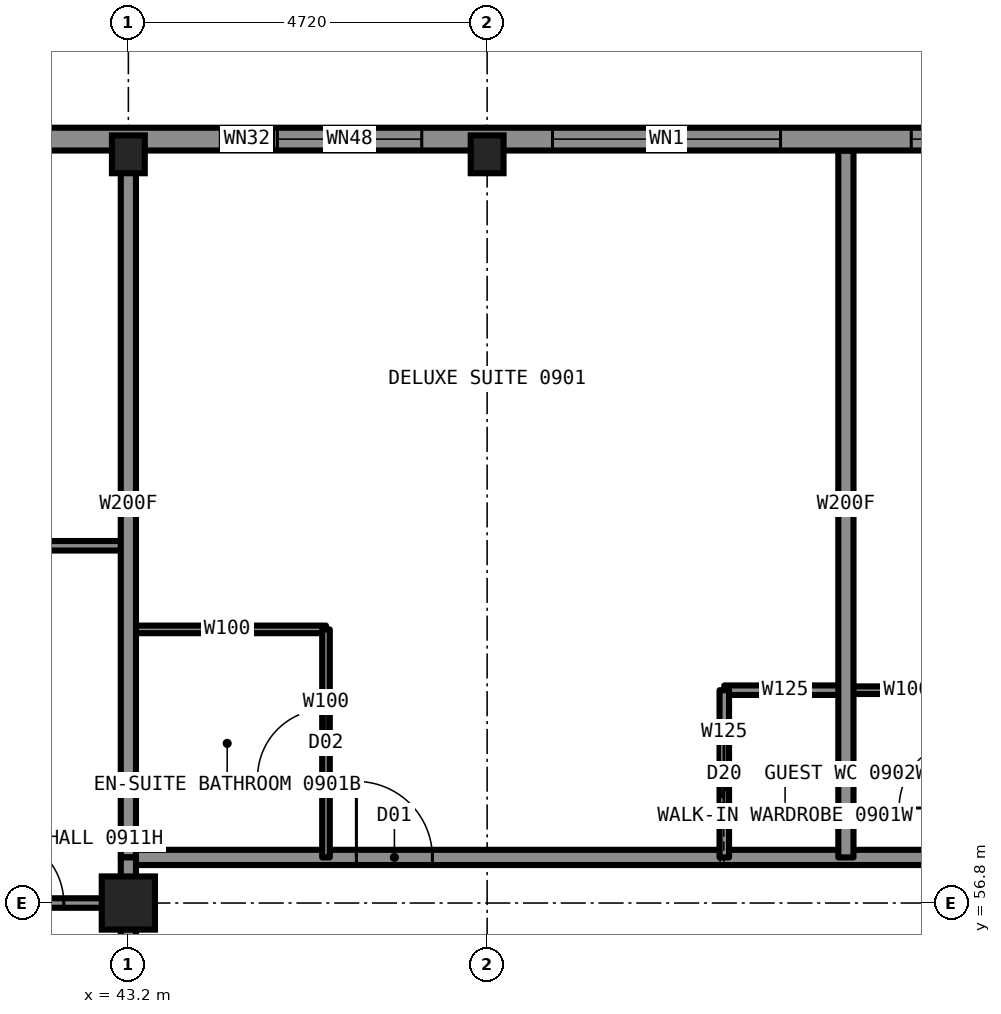
"""IFC4 building model, lengths in metres.
Left out: names, types, materials, properties, quantities, classifications, styles, units other than length and angle.
Written with IfcOpenShell. Run it as: python <this file> out.ifc"""

import sys

from ifc_helpers import new_model, si_unit, direction, frame, frame_2d, origin, origin_2d, place, context, subcontext, project, spatial, rectangle, hollow_rectangle, i_section, extrude, element, fill, save


model = new_model("IFC4")
c1 = context("Model", 3, precision=1e-05, world=origin(), true_north=direction((0.0, 1.0)))
c2 = subcontext(c1, "Body", "Model", "MODEL_VIEW")
j1 = project(units=[si_unit("LENGTHUNIT", "METRE"), si_unit("PLANEANGLEUNIT", "RADIAN")], contexts=[c1])
p1 = place(None, origin())
s1 = spatial("IfcSite", under=j1, at=p1, CompositionType="ELEMENT")
p2 = place(p1, origin())
s2 = spatial("IfcBuilding", under=s1, at=p2, CompositionType="ELEMENT")
p3 = place(p2, frame((0.0, 0.0, 39.0)))
s3 = spatial("IfcBuildingStorey", under=s2, at=p3, CompositionType="ELEMENT", Elevation=39.0)
for number, where, z_axis, x_axis in (
    (1, (43.2, 66.65, 0.0), (0.0, 0.0, 1.0), (1.0, 0.0, 0.0)),
    (2, (47.92, 66.65, 0.0), (0.0, 0.0, 1.0), (1.0, 0.0, 0.0)),
):
    element("IfcColumn", number, at=place(p3, frame(where, z_axis=z_axis, x_axis=x_axis)), inside=s3, PredefinedType="COLUMN", context=c2, shape_type="SweptSolid", body=[
        extrude(i_section(OverallWidth=0.432, OverallDepth=0.498, WebThickness=0.056, FlangeThickness=0.089, at=origin_2d()), origin(), (0.0, 0.0, 1.0), 3.5),
    ])
p4 = place(p3, frame((43.2, 56.8, 0.0), z_axis=(0.0, 0.0, 1.0), x_axis=(1.0, 0.0, 0.0)))
e3 = element("IfcColumn", 3, at=p4, inside=s3, PredefinedType="COLUMN", context=c2, shape_type="SweptSolid", body=[
    extrude(hollow_rectangle(XDim=0.7, YDim=0.7, WallThickness=0.06, at=origin_2d()), origin(), (0.0, 0.0, 1.0), 3.5),
])
p5 = place(p3, frame((33.3, 56.8, 0.0), z_axis=(0.0, 0.0, 1.0), x_axis=(1.0, 0.0, 0.0)))
e4 = element("IfcWall", 4, at=p5, inside=s3, PredefinedType="PARTITIONING", context=c2, shape_type="SweptSolid", body=[
    extrude(rectangle(XDim=9.9, YDim=0.125, at=frame_2d((4.95, 0.0))), origin(), (0.0, 0.0, 1.0), 2.573),
])
p6 = place(p5, frame((8.15, 0.0, 0.0)))
e5 = element("IfcOpeningElement", 5, at=p6, cuts=e4, PredefinedType="OPENING", context=c2, shape_type="SweptSolid", body=[
    extrude(rectangle(XDim=0.9, YDim=2.2, at=frame_2d((0.45, 1.1))), frame((0.0, 0.073, 0.0), z_axis=(0.0, -1.0, 0.0), x_axis=(1.0, 0.0, 0.0)), (0.0, 0.0, 1.0), 0.145),
])
p7 = place(p3, frame((43.2, 57.4, 0.0), z_axis=(0.0, 0.0, 1.0), x_axis=(1.0, 0.0, 0.0)))
e6 = element("IfcWall", 6, at=p7, inside=s3, PredefinedType="PARTITIONING", context=c2, shape_type="SweptSolid", body=[
    extrude(rectangle(XDim=23.6, YDim=0.2, at=frame_2d((11.8, 0.0))), origin(), (0.0, 0.0, 1.0), 3.33),
])
p8 = place(p7, frame((3.0, 0.0, 0.0)))
e7 = element("IfcOpeningElement", 7, at=p8, cuts=e6, PredefinedType="OPENING", context=c2, shape_type="SweptSolid", body=[
    extrude(rectangle(XDim=1.0, YDim=2.2, at=frame_2d((0.5, 1.1))), frame((0.0, 0.11, 0.0), z_axis=(0.0, -1.0, 0.0), x_axis=(1.0, 0.0, 0.0)), (0.0, 0.0, 1.0), 0.22),
])
p9 = place(p7, frame((11.29, 0.0, 0.0)))
e8 = element("IfcOpeningElement", 8, at=p9, cuts=e6, PredefinedType="OPENING", context=c2, shape_type="SweptSolid", body=[
    extrude(rectangle(XDim=1.1, YDim=2.2, at=frame_2d((0.55, 1.1))), frame((0.0, 0.11, 0.0), z_axis=(0.0, -1.0, 0.0), x_axis=(1.0, 0.0, 0.0)), (0.0, 0.0, 1.0), 0.22),
])
p10 = place(p3, frame((52.64, 59.6, 0.0), z_axis=(0.0, 0.0, 1.0), x_axis=(1.0, 0.0, 0.0)))
e9 = element("IfcWall", 9, at=p10, inside=s3, PredefinedType="PARTITIONING", context=c2, shape_type="SweptSolid", body=[
    extrude(rectangle(XDim=1.6, YDim=0.1, at=frame_2d((0.8, 0.0))), origin(), (0.0, 0.0, 1.0), 3.33),
])
p11 = place(p3, frame((51.04, 59.6, 0.0), z_axis=(0.0, 0.0, 1.0), x_axis=(1.0, 0.0, 0.0)))
e10 = element("IfcWall", 10, at=p11, inside=s3, PredefinedType="PARTITIONING", context=c2, shape_type="SweptSolid", body=[
    extrude(rectangle(XDim=1.6, YDim=0.125, at=frame_2d((0.8, 0.0))), origin(), (0.0, 0.0, 1.0), 3.33),
])
p12 = place(p3, frame((43.2, 60.4, 0.0), z_axis=(0.0, 0.0, 1.0), x_axis=(1.0, 0.0, 0.0)))
e11 = element("IfcWall", 11, at=p12, inside=s3, PredefinedType="PARTITIONING", context=c2, shape_type="SweptSolid", body=[
    extrude(rectangle(XDim=2.6, YDim=0.1, at=frame_2d((1.3, 0.0))), origin(), (0.0, 0.0, 1.0), 3.33),
])
p13 = place(p3, frame((33.306, 61.5, 0.0), z_axis=(0.0, 0.0, 1.0), x_axis=(1.0, 0.0, 0.0)))
e12 = element("IfcWall", 12, at=p13, inside=s3, PredefinedType="PARTITIONING", context=c2, shape_type="SweptSolid", body=[
    extrude(rectangle(XDim=9.894, YDim=0.125, at=frame_2d((4.947, 0.0))), origin(), (0.0, 0.0, 1.0), 3.33),
])
p14 = place(p13, frame((7.244, 0.0, 0.0)))
e13 = element("IfcOpeningElement", 13, at=p14, cuts=e12, PredefinedType="OPENING", context=c2, shape_type="SweptSolid", body=[
    extrude(rectangle(XDim=0.9, YDim=2.2, at=frame_2d((0.45, 1.1))), frame((0.0, 0.073, 0.0), z_axis=(0.0, -1.0, 0.0), x_axis=(1.0, 0.0, 0.0)), (0.0, 0.0, 1.0), 0.145),
])
p15 = place(p3, frame((43.2, 33.2, 0.0), z_axis=(0.0, 0.0, 1.0), x_axis=(0.0, 1.0, 0.0)))
e14 = element("IfcWall", 14, at=p15, inside=s3, PredefinedType="PARTITIONING", context=c2, shape_type="SweptSolid", body=[
    extrude(rectangle(XDim=23.58, YDim=0.2, at=frame_2d((11.79, 0.0))), origin(), (0.0, 0.0, 1.0), 3.33),
])
p16 = place(p15, frame((7.27, 0.0, 0.0)))
e15 = element("IfcOpeningElement", 15, at=p16, cuts=e14, PredefinedType="OPENING", context=c2, shape_type="SweptSolid", body=[
    extrude(rectangle(XDim=1.0, YDim=2.2, at=frame_2d((0.5, 1.1))), frame((0.0, 0.11, 0.0), z_axis=(0.0, -1.0, 0.0), x_axis=(1.0, 0.0, 0.0)), (0.0, 0.0, 1.0), 0.22),
])
p17 = place(p15, frame((12.44, 0.0, 0.0)))
e16 = element("IfcOpeningElement", 16, at=p17, cuts=e14, PredefinedType="OPENING", context=c2, shape_type="SweptSolid", body=[
    extrude(rectangle(XDim=1.0, YDim=2.2, at=frame_2d((0.5, 1.1))), frame((0.0, 0.11, 0.0), z_axis=(0.0, -1.0, 0.0), x_axis=(1.0, 0.0, 0.0)), (0.0, 0.0, 1.0), 0.22),
])
p18 = place(p15, frame((21.84, 0.0, 0.0)))
e17 = element("IfcOpeningElement", 17, at=p18, cuts=e14, PredefinedType="OPENING", context=c2, shape_type="SweptSolid", body=[
    extrude(rectangle(XDim=1.1, YDim=2.2, at=frame_2d((0.55, 1.1))), frame((0.0, 0.11, 0.0), z_axis=(0.0, -1.0, 0.0), x_axis=(1.0, 0.0, 0.0)), (0.0, 0.0, 1.0), 0.22),
])
p19 = place(p15, frame((0.66, 0.0, 0.0)))
e18 = element("IfcOpeningElement", 18, at=p19, cuts=e14, PredefinedType="OPENING", context=c2, shape_type="SweptSolid", body=[
    extrude(rectangle(XDim=1.1, YDim=2.2, at=frame_2d((0.55, 1.1))), frame((0.0, 0.11, 0.0), z_axis=(0.0, -1.0, 0.0), x_axis=(1.0, 0.0, 0.0)), (0.0, 0.0, 1.0), 0.22),
])
p20 = place(p3, frame((43.2, 57.4, 0.0), z_axis=(0.0, 0.0, 1.0), x_axis=(0.0, 1.0, 0.0)))
e19 = element("IfcWall", 19, at=p20, inside=s3, PredefinedType="PARTITIONING", context=c2, shape_type="SweptSolid", body=[
    extrude(rectangle(XDim=9.3, YDim=0.2, at=frame_2d((4.65, 0.0))), origin(), (0.0, 0.0, 1.0), 2.573),
])
p21 = place(p3, frame((52.64, 57.4, 0.0), z_axis=(0.0, 0.0, 1.0), x_axis=(0.0, 1.0, 0.0)))
e20 = element("IfcWall", 20, at=p21, inside=s3, PredefinedType="PARTITIONING", context=c2, shape_type="SweptSolid", body=[
    extrude(rectangle(XDim=9.3, YDim=0.2, at=frame_2d((4.65, 0.0))), origin(), (0.0, 0.0, 1.0), 3.33),
])
p22 = place(p3, frame((51.04, 57.4, 0.0), z_axis=(0.0, 0.0, 1.0), x_axis=(0.0, 1.0, 0.0)))
e21 = element("IfcWall", 21, at=p22, inside=s3, PredefinedType="PARTITIONING", context=c2, shape_type="SweptSolid", body=[
    extrude(rectangle(XDim=2.2, YDim=0.125, at=frame_2d((1.1, 0.0))), origin(), (0.0, 0.0, 1.0), 3.33),
])
p23 = place(p22, frame((0.7, 0.0, 0.0)))
e22 = element("IfcOpeningElement", 22, at=p23, cuts=e21, PredefinedType="OPENING", context=c2, shape_type="SweptSolid", body=[
    extrude(rectangle(XDim=0.8, YDim=2.1, at=frame_2d((0.4, 1.05))), frame((0.0, 0.073, 0.0), z_axis=(0.0, -1.0, 0.0), x_axis=(1.0, 0.0, 0.0)), (0.0, 0.0, 1.0), 0.145),
])
p24 = place(p3, frame((45.8, 57.4, 0.0), z_axis=(0.0, 0.0, 1.0), x_axis=(0.0, 1.0, 0.0)))
e23 = element("IfcWall", 23, at=p24, inside=s3, PredefinedType="PARTITIONING", context=c2, shape_type="SweptSolid", body=[
    extrude(rectangle(XDim=3.0, YDim=0.1, at=frame_2d((1.5, 0.0))), origin(), (0.0, 0.0, 1.0), 3.33),
])
p25 = place(p24, frame((1.05, 0.0, 0.0)))
e24 = element("IfcOpeningElement", 24, at=p25, cuts=e23, PredefinedType="OPENING", context=c2, shape_type="SweptSolid", body=[
    extrude(rectangle(XDim=0.9, YDim=2.1, at=frame_2d((0.45, 1.05))), frame((0.0, 0.06, 0.0), z_axis=(0.0, -1.0, 0.0), x_axis=(1.0, 0.0, 0.0)), (0.0, 0.0, 1.0), 0.12),
])
p26 = place(p3, frame((71.5, 66.85, 0.0), z_axis=(0.0, 0.0, 1.0), x_axis=(-1.0, 0.0, 0.0)))
e25 = element("IfcWall", 25, at=p26, inside=s3, PredefinedType="SOLIDWALL", context=c2, shape_type="SweptSolid", body=[
    extrude(rectangle(XDim=33.0, YDim=0.3, at=frame_2d((16.5, 0.0))), origin(), (0.0, 0.0, 1.0), 2.83),
])
p27 = place(p26, frame((0.85, 0.0, 0.5)))
e26 = element("IfcOpeningElement", 26, at=p27, cuts=e25, PredefinedType="OPENING", context=c2, shape_type="SweptSolid", body=[
    extrude(rectangle(XDim=2.5, YDim=2.0, at=frame_2d((1.25, 1.0))), frame((0.0, 0.16, 0.0), z_axis=(0.0, -1.0, 0.0), x_axis=(1.0, 0.0, 0.0)), (0.0, 0.0, 1.0), 0.32),
])
p28 = place(p26, frame((6.61, 0.0, 0.5)))
e27 = element("IfcOpeningElement", 27, at=p28, cuts=e25, PredefinedType="OPENING", context=c2, shape_type="SweptSolid", body=[
    extrude(rectangle(XDim=1.9, YDim=1.9, at=frame_2d((0.95, 0.95))), frame((0.0, 0.16, 0.0), z_axis=(0.0, -1.0, 0.0), x_axis=(1.0, 0.0, 0.0)), (0.0, 0.0, 1.0), 0.32),
])
p29 = place(p26, frame((10.28, 0.0, 0.5)))
e28 = element("IfcOpeningElement", 28, at=p29, cuts=e25, PredefinedType="OPENING", context=c2, shape_type="SweptSolid", body=[
    extrude(rectangle(XDim=3.0, YDim=2.0, at=frame_2d((1.5, 1.0))), frame((0.0, 0.16, 0.0), z_axis=(0.0, -1.0, 0.0), x_axis=(1.0, 0.0, 0.0)), (0.0, 0.0, 1.0), 0.32),
])
p30 = place(p26, frame((15.0, 0.0, 0.5)))
e29 = element("IfcOpeningElement", 29, at=p30, cuts=e25, PredefinedType="OPENING", context=c2, shape_type="SweptSolid", body=[
    extrude(rectangle(XDim=3.0, YDim=2.0, at=frame_2d((1.5, 1.0))), frame((0.0, 0.16, 0.0), z_axis=(0.0, -1.0, 0.0), x_axis=(1.0, 0.0, 0.0)), (0.0, 0.0, 1.0), 0.32),
])
p31 = place(p26, frame((19.72, 0.0, 0.5)))
e30 = element("IfcOpeningElement", 30, at=p31, cuts=e25, PredefinedType="OPENING", context=c2, shape_type="SweptSolid", body=[
    extrude(rectangle(XDim=3.0, YDim=2.0, at=frame_2d((1.5, 1.0))), frame((0.0, 0.16, 0.0), z_axis=(0.0, -1.0, 0.0), x_axis=(1.0, 0.0, 0.0)), (0.0, 0.0, 1.0), 0.32),
])
p32 = place(p26, frame((24.44, 0.0, 0.5)))
e31 = element("IfcOpeningElement", 31, at=p32, cuts=e25, PredefinedType="OPENING", context=c2, shape_type="SweptSolid", body=[
    extrude(rectangle(XDim=1.9, YDim=1.9, at=frame_2d((0.95, 0.95))), frame((0.0, 0.16, 0.0), z_axis=(0.0, -1.0, 0.0), x_axis=(1.0, 0.0, 0.0)), (0.0, 0.0, 1.0), 0.32),
])
p33 = place(p26, frame((29.6, 0.0, 0.5)))
e32 = element("IfcOpeningElement", 32, at=p33, cuts=e25, PredefinedType="OPENING", context=c2, shape_type="SweptSolid", body=[
    extrude(rectangle(XDim=2.5, YDim=2.0, at=frame_2d((1.25, 1.0))), frame((0.0, 0.16, 0.0), z_axis=(0.0, -1.0, 0.0), x_axis=(1.0, 0.0, 0.0)), (0.0, 0.0, 1.0), 0.32),
])
p34 = place(p26, frame((5.91, 0.0, 0.5)))
e33 = element("IfcOpeningElement", 33, at=p34, cuts=e25, PredefinedType="OPENING", context=c2, shape_type="SweptSolid", body=[
    extrude(rectangle(XDim=0.7, YDim=1.0, at=frame_2d((0.35, 0.5))), frame((0.0, 0.16, 0.0), z_axis=(0.0, -1.0, 0.0), x_axis=(1.0, 0.0, 0.0)), (0.0, 0.0, 1.0), 0.32),
])
p35 = place(p26, frame((26.39, 0.0, 0.5)))
e34 = element("IfcOpeningElement", 34, at=p35, cuts=e25, PredefinedType="OPENING", context=c2, shape_type="SweptSolid", body=[
    extrude(rectangle(XDim=0.7, YDim=1.0, at=frame_2d((0.35, 0.5))), frame((0.0, 0.16, 0.0), z_axis=(0.0, -1.0, 0.0), x_axis=(1.0, 0.0, 0.0)), (0.0, 0.0, 1.0), 0.32),
])
p36 = place(p3, frame((43.2, 56.78, 0.0), z_axis=(0.0, 0.0, 1.0), x_axis=(0.0, 1.0, 0.0)))
e35 = element("IfcWall", 35, at=p36, inside=s3, PredefinedType="PARTITIONING", context=c2, shape_type="SweptSolid", body=[
    extrude(rectangle(XDim=0.62, YDim=0.2, at=frame_2d((0.31, 0.0))), origin(), (0.0, 0.0, 1.0), 2.573),
])
p37 = place(p8, origin())
e36 = element("IfcDoor", 36, at=p37, inside=s3, OperationType="SINGLE_SWING_LEFT", PredefinedType="DOOR", context=c2, shape_type="SweptSolid", body=[
    extrude(rectangle(XDim=1.0, YDim=2.2, at=frame_2d((0.5, 1.1))), frame((0.0, 0.025, 0.0), z_axis=(0.0, -1.0, 0.0), x_axis=(1.0, 0.0, 0.0)), (0.0, 0.0, 1.0), 0.05),
])
fill(e7, e36)
p38 = place(p25, origin())
e37 = element("IfcDoor", 37, at=p38, inside=s3, OperationType="SINGLE_SWING_RIGHT", PredefinedType="DOOR", context=c2, shape_type="SweptSolid", body=[
    extrude(rectangle(XDim=0.9, YDim=2.1, at=frame_2d((0.45, 1.05))), frame((0.0, 0.025, 0.0), z_axis=(0.0, -1.0, 0.0), x_axis=(1.0, 0.0, 0.0)), (0.0, 0.0, 1.0), 0.05),
])
fill(e24, e37)
p39 = place(p23, origin())
e38 = element("IfcDoor", 38, at=p39, inside=s3, OperationType="SLIDING_TO_LEFT", PredefinedType="DOOR", context=c2, shape_type="SweptSolid", body=[
    extrude(rectangle(XDim=0.8, YDim=2.1, at=frame_2d((0.4, 1.05))), frame((0.0, 0.025, 0.0), z_axis=(0.0, -1.0, 0.0), x_axis=(1.0, 0.0, 0.0)), (0.0, 0.0, 1.0), 0.05),
])
fill(e22, e38)
p40 = place(p6, origin())
e39 = element("IfcDoor", 39, at=p40, inside=s3, OperationType="SINGLE_SWING_LEFT", PredefinedType="DOOR", context=c2, shape_type="SweptSolid", body=[
    extrude(rectangle(XDim=0.9, YDim=2.2, at=frame_2d((0.45, 1.1))), frame((0.0, 0.025, 0.0), z_axis=(0.0, -1.0, 0.0), x_axis=(1.0, 0.0, 0.0)), (0.0, 0.0, 1.0), 0.05),
])
fill(e5, e39)
p41 = place(p30, origin())
e40 = element("IfcWindow", 40, at=p41, inside=s3, PartitioningType="SINGLE_PANEL", PredefinedType="WINDOW", context=c2, shape_type="SweptSolid", body=[
    extrude(rectangle(XDim=3.0, YDim=2.0, at=frame_2d((1.5, 1.0))), frame((0.0, 0.03, 0.0), z_axis=(0.0, -1.0, 0.0), x_axis=(1.0, 0.0, 0.0)), (0.0, 0.0, 1.0), 0.06),
])
fill(e29, e40)
p42 = place(p31, origin())
e41 = element("IfcWindow", 41, at=p42, inside=s3, PartitioningType="SINGLE_PANEL", PredefinedType="WINDOW", context=c2, shape_type="SweptSolid", body=[
    extrude(rectangle(XDim=3.0, YDim=2.0, at=frame_2d((1.5, 1.0))), frame((0.0, 0.03, 0.0), z_axis=(0.0, -1.0, 0.0), x_axis=(1.0, 0.0, 0.0)), (0.0, 0.0, 1.0), 0.06),
])
fill(e30, e41)
p43 = place(p32, origin())
e42 = element("IfcWindow", 42, at=p43, inside=s3, PartitioningType="SINGLE_PANEL", PredefinedType="WINDOW", context=c2, shape_type="SweptSolid", body=[
    extrude(rectangle(XDim=1.9, YDim=1.9, at=frame_2d((0.95, 0.95))), frame((0.0, 0.03, 0.0), z_axis=(0.0, -1.0, 0.0), x_axis=(1.0, 0.0, 0.0)), (0.0, 0.0, 1.0), 0.06),
])
fill(e31, e42)
p44 = place(p35, origin())
e43 = element("IfcWindow", 43, at=p44, inside=s3, PartitioningType="SINGLE_PANEL", PredefinedType="WINDOW", context=c2, shape_type="SweptSolid", body=[
    extrude(rectangle(XDim=0.7, YDim=1.0, at=frame_2d((0.35, 0.5))), frame((0.0, 0.03, 0.0), z_axis=(0.0, -1.0, 0.0), x_axis=(1.0, 0.0, 0.0)), (0.0, 0.0, 1.0), 0.06),
])
fill(e34, e43)
save(model, sys.argv[1])
